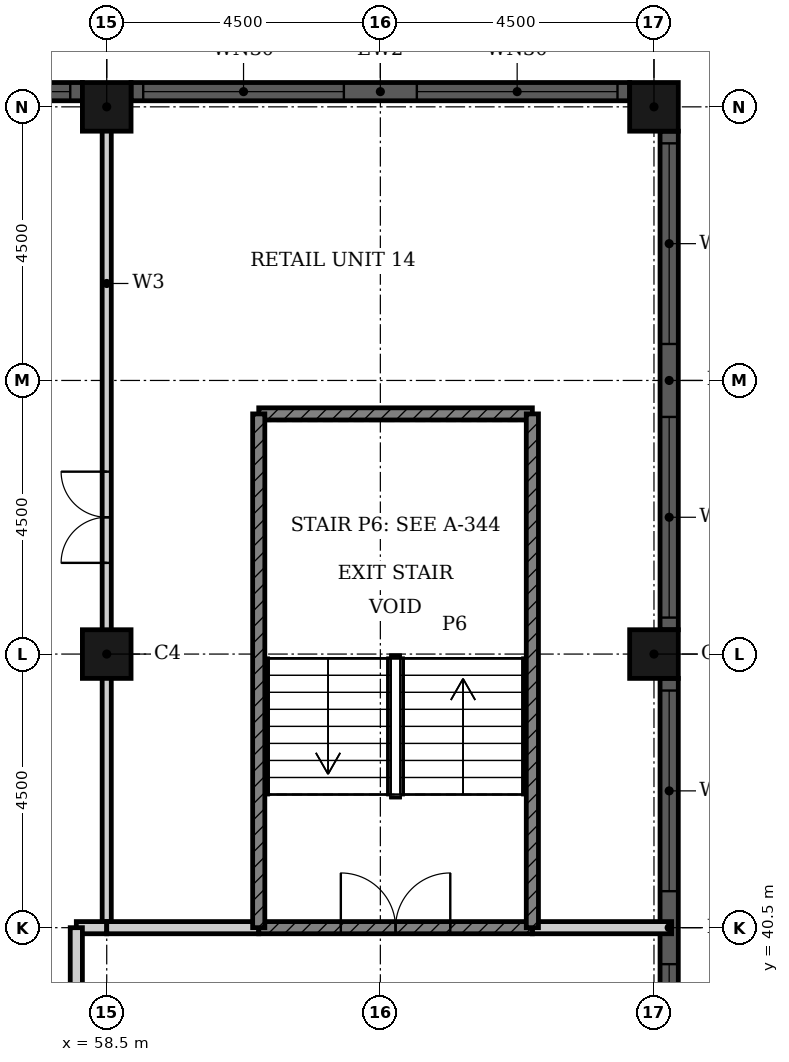
"""IFC4 building model, lengths in metres.
Left out: names, types, materials, properties, quantities, classifications, styles, units other than length and angle.
Written with IfcOpenShell. Run it as: python <this file> out.ifc"""

import sys

from ifc_helpers import new_model, si_unit, direction, frame, frame_2d, origin, origin_2d, place, context, subcontext, project, spatial, rectangle, hollow_rectangle, extrude, element, fill, save


model = new_model("IFC4")
c1 = context("Model", 3, precision=1e-05, world=origin(), true_north=direction((0.0, 1.0)))
c2 = subcontext(c1, "Body", "Model", "MODEL_VIEW")
j1 = project(units=[si_unit("LENGTHUNIT", "METRE"), si_unit("PLANEANGLEUNIT", "RADIAN")], contexts=[c1])
p1 = place(None, origin())
s1 = spatial("IfcSite", under=j1, at=p1, CompositionType="ELEMENT")
p2 = place(p1, origin())
s2 = spatial("IfcBuilding", under=s1, at=p2, CompositionType="ELEMENT")
p3 = place(p2, frame((0.0, 0.0, 6.6)))
s3 = spatial("IfcBuildingStorey", under=s2, at=p3, CompositionType="ELEMENT", Elevation=6.6)
for number, where, z_axis, x_axis in (
    (1, (58.5, 54.0, 0.0), (0.0, 0.0, 1.0), (1.0, 0.0, 0.0)),
    (2, (67.5, 45.0, 0.0), (0.0, 0.0, 1.0), (1.0, 0.0, 0.0)),
    (3, (67.5, 54.0, 0.0), (0.0, 0.0, 1.0), (1.0, 0.0, 0.0)),
    (4, (58.5, 45.0, 0.0), (0.0, 0.0, 1.0), (1.0, 0.0, 0.0)),
):
    element("IfcColumn", number, at=place(p3, frame(where, z_axis=z_axis, x_axis=x_axis)), inside=s3, PredefinedType="COLUMN", context=c2, shape_type="SweptSolid", body=[
        extrude(hollow_rectangle(XDim=0.8, YDim=0.8, WallThickness=0.025, at=origin_2d()), origin(), (0.0, 0.0, 1.0), 5.4),
    ])
p4 = place(p3, frame((67.75, 36.4, 0.0), z_axis=(0.0, 0.0, 1.0), x_axis=(0.0, 1.0, 0.0)))
e5 = element("IfcWall", 5, at=p4, inside=s3, PredefinedType="SOLIDWALL", context=c2, shape_type="SweptSolid", body=[
    extrude(rectangle(XDim=8.2, YDim=0.3, at=frame_2d((4.1, 0.0))), origin(), (0.0, 0.0, 1.0), 5.4),
])
p5 = place(p4, frame((0.2, 0.0, 0.9)))
e6 = element("IfcOpeningElement", 6, at=p5, cuts=e5, PredefinedType="OPENING", context=c2, shape_type="SweptSolid", body=[
    extrude(rectangle(XDim=3.3, YDim=3.5, at=frame_2d((1.65, 1.75))), frame((0.0, 0.16, 0.0), z_axis=(0.0, -1.0, 0.0), x_axis=(1.0, 0.0, 0.0)), (0.0, 0.0, 1.0), 0.32),
])
p6 = place(p4, frame((4.7, 0.0, 0.9)))
e7 = element("IfcOpeningElement", 7, at=p6, cuts=e5, PredefinedType="OPENING", context=c2, shape_type="SweptSolid", body=[
    extrude(rectangle(XDim=3.3, YDim=3.5, at=frame_2d((1.65, 1.75))), frame((0.0, 0.16, 0.0), z_axis=(0.0, -1.0, 0.0), x_axis=(1.0, 0.0, 0.0)), (0.0, 0.0, 1.0), 0.32),
])
p7 = place(p3, frame((67.75, 45.4, 0.0), z_axis=(0.0, 0.0, 1.0), x_axis=(0.0, 1.0, 0.0)))
e8 = element("IfcWall", 8, at=p7, inside=s3, PredefinedType="SOLIDWALL", context=c2, shape_type="SweptSolid", body=[
    extrude(rectangle(XDim=8.2, YDim=0.3, at=frame_2d((4.1, 0.0))), origin(), (0.0, 0.0, 1.0), 5.4),
])
p8 = place(p7, frame((0.2, 0.0, 0.9)))
e9 = element("IfcOpeningElement", 9, at=p8, cuts=e8, PredefinedType="OPENING", context=c2, shape_type="SweptSolid", body=[
    extrude(rectangle(XDim=3.3, YDim=3.5, at=frame_2d((1.65, 1.75))), frame((0.0, 0.16, 0.0), z_axis=(0.0, -1.0, 0.0), x_axis=(1.0, 0.0, 0.0)), (0.0, 0.0, 1.0), 0.32),
])
p9 = place(p7, frame((4.7, 0.0, 0.9)))
e10 = element("IfcOpeningElement", 10, at=p9, cuts=e8, PredefinedType="OPENING", context=c2, shape_type="SweptSolid", body=[
    extrude(rectangle(XDim=3.3, YDim=3.5, at=frame_2d((1.65, 1.75))), frame((0.0, 0.16, 0.0), z_axis=(0.0, -1.0, 0.0), x_axis=(1.0, 0.0, 0.0)), (0.0, 0.0, 1.0), 0.32),
])
p10 = place(p3, frame((67.1, 54.25, 0.0), z_axis=(0.0, 0.0, 1.0), x_axis=(-1.0, 0.0, 0.0)))
e11 = element("IfcWall", 11, at=p10, inside=s3, PredefinedType="SOLIDWALL", context=c2, shape_type="SweptSolid", body=[
    extrude(rectangle(XDim=8.2, YDim=0.3, at=frame_2d((4.1, 0.0))), origin(), (0.0, 0.0, 1.0), 5.4),
])
p11 = place(p10, frame((0.2, 0.0, 0.9)))
e12 = element("IfcOpeningElement", 12, at=p11, cuts=e11, PredefinedType="OPENING", context=c2, shape_type="SweptSolid", body=[
    extrude(rectangle(XDim=3.3, YDim=3.5, at=frame_2d((1.65, 1.75))), frame((0.0, 0.16, 0.0), z_axis=(0.0, -1.0, 0.0), x_axis=(1.0, 0.0, 0.0)), (0.0, 0.0, 1.0), 0.32),
])
p12 = place(p10, frame((4.7, 0.0, 0.9)))
e13 = element("IfcOpeningElement", 13, at=p12, cuts=e11, PredefinedType="OPENING", context=c2, shape_type="SweptSolid", body=[
    extrude(rectangle(XDim=3.3, YDim=3.5, at=frame_2d((1.65, 1.75))), frame((0.0, 0.16, 0.0), z_axis=(0.0, -1.0, 0.0), x_axis=(1.0, 0.0, 0.0)), (0.0, 0.0, 1.0), 0.32),
])
p13 = place(p3, frame((58.1, 54.25, 0.0), z_axis=(0.0, 0.0, 1.0), x_axis=(-1.0, 0.0, 0.0)))
e14 = element("IfcWall", 14, at=p13, inside=s3, PredefinedType="SOLIDWALL", context=c2, shape_type="SweptSolid", body=[
    extrude(rectangle(XDim=8.2, YDim=0.3, at=frame_2d((4.1, 0.0))), origin(), (0.0, 0.0, 1.0), 5.4),
])
p14 = place(p13, frame((0.2, 0.0, 0.9)))
e15 = element("IfcOpeningElement", 15, at=p14, cuts=e14, PredefinedType="OPENING", context=c2, shape_type="SweptSolid", body=[
    extrude(rectangle(XDim=3.3, YDim=3.5, at=frame_2d((1.65, 1.75))), frame((0.0, 0.16, 0.0), z_axis=(0.0, -1.0, 0.0), x_axis=(1.0, 0.0, 0.0)), (0.0, 0.0, 1.0), 0.32),
])
p15 = place(p13, frame((4.7, 0.0, 0.9)))
e16 = element("IfcOpeningElement", 16, at=p15, cuts=e14, PredefinedType="OPENING", context=c2, shape_type="SweptSolid", body=[
    extrude(rectangle(XDim=3.3, YDim=3.5, at=frame_2d((1.65, 1.75))), frame((0.0, 0.16, 0.0), z_axis=(0.0, -1.0, 0.0), x_axis=(1.0, 0.0, 0.0)), (0.0, 0.0, 1.0), 0.32),
])
p16 = place(p3, frame((58.5, 40.5, 0.0), z_axis=(0.0, 0.0, 1.0), x_axis=(0.0, 1.0, 0.0)))
e17 = element("IfcWall", 17, at=p16, inside=s3, PredefinedType="PARTITIONING", context=c2, shape_type="SweptSolid", body=[
    extrude(rectangle(XDim=13.69, YDim=0.15, at=frame_2d((6.845, 0.0))), origin(), (0.0, 0.0, 1.0), 5.05),
])
p17 = place(p16, frame((6.0, 0.0, 0.0)))
e18 = element("IfcOpeningElement", 18, at=p17, cuts=e17, PredefinedType="OPENING", context=c2, shape_type="SweptSolid", body=[
    extrude(rectangle(XDim=1.5, YDim=2.4, at=frame_2d((0.75, 1.2))), frame((0.0, 0.085, 0.0), z_axis=(0.0, -1.0, 0.0), x_axis=(1.0, 0.0, 0.0)), (0.0, 0.0, 1.0), 0.17),
])
p18 = place(p3, frame((58.0, 40.5, 0.0), z_axis=(0.0, 0.0, 1.0), x_axis=(1.0, 0.0, 0.0)))
e19 = element("IfcWall", 19, at=p18, inside=s3, PredefinedType="PARTITIONING", context=c2, shape_type="SweptSolid", body=[
    extrude(rectangle(XDim=0.5, YDim=0.2, at=frame_2d((0.25, 0.0))), origin(), (0.0, 0.0, 1.0), 5.05),
])
p19 = place(p3, frame((58.5, 40.5, 0.0), z_axis=(0.0, 0.0, 1.0), x_axis=(1.0, 0.0, 0.0)))
e20 = element("IfcWall", 20, at=p19, inside=s3, PredefinedType="PARTITIONING", context=c2, shape_type="SweptSolid", body=[
    extrude(rectangle(XDim=2.5, YDim=0.2, at=frame_2d((1.25, 0.0))), origin(), (0.0, 0.0, 1.0), 5.05),
])
p20 = place(p3, frame((65.5, 40.5, 0.0), z_axis=(0.0, 0.0, 1.0), x_axis=(1.0, 0.0, 0.0)))
e21 = element("IfcWall", 21, at=p20, inside=s3, PredefinedType="PARTITIONING", context=c2, shape_type="SweptSolid", body=[
    extrude(rectangle(XDim=2.29, YDim=0.2, at=frame_2d((1.145, 0.0))), origin(), (0.0, 0.0, 1.0), 5.05),
])
p21 = place(p3, frame((58.0, 37.5, 0.0), z_axis=(0.0, 0.0, 1.0), x_axis=(0.0, 1.0, 0.0)))
e22 = element("IfcWall", 22, at=p21, inside=s3, PredefinedType="PARTITIONING", context=c2, shape_type="SweptSolid", body=[
    extrude(rectangle(XDim=3.0, YDim=0.2, at=frame_2d((1.5, 0.0))), origin(), (0.0, 0.0, 1.0), 5.05),
])
p22 = place(p3, frame((61.0, 40.5, 0.0), z_axis=(0.0, 0.0, 1.0), x_axis=(1.0, 0.0, 0.0)))
e23 = element("IfcWall", 23, at=p22, inside=s3, PredefinedType="SHEAR", context=c2, shape_type="SweptSolid", body=[
    extrude(rectangle(XDim=4.5, YDim=0.2, at=frame_2d((2.25, 0.0))), origin(), (0.0, 0.0, 1.0), 5.05),
])
p23 = place(p22, frame((1.35, 0.0, 0.0)))
e24 = element("IfcOpeningElement", 24, at=p23, cuts=e23, PredefinedType="OPENING", context=c2, shape_type="SweptSolid", body=[
    extrude(rectangle(XDim=1.8, YDim=2.1, at=frame_2d((0.9, 1.05))), frame((0.0, 0.11, 0.0), z_axis=(0.0, -1.0, 0.0), x_axis=(1.0, 0.0, 0.0)), (0.0, 0.0, 1.0), 0.22),
])
p24 = place(p3, frame((61.0, 48.95, 0.0), z_axis=(0.0, 0.0, 1.0), x_axis=(1.0, 0.0, 0.0)))
e25 = element("IfcWall", 25, at=p24, inside=s3, PredefinedType="SHEAR", context=c2, shape_type="SweptSolid", body=[
    extrude(rectangle(XDim=4.5, YDim=0.2, at=frame_2d((2.25, 0.0))), origin(), (0.0, 0.0, 1.0), 5.05),
])
for number, where, z_axis, x_axis in (
    (26, (61.0, 40.5, 0.0), (0.0, 0.0, 1.0), (0.0, 1.0, 0.0)),
    (27, (65.5, 40.5, 0.0), (0.0, 0.0, 1.0), (0.0, 1.0, 0.0)),
):
    element("IfcWall", number, at=place(p3, frame(where, z_axis=z_axis, x_axis=x_axis)), inside=s3, PredefinedType="SHEAR", context=c2, shape_type="SweptSolid", body=[
        extrude(rectangle(XDim=8.45, YDim=0.2, at=frame_2d((4.225, 0.0))), origin(), (0.0, 0.0, 1.0), 5.05),
    ])
p25 = place(p5, origin())
e28 = element("IfcWindow", 28, at=p25, inside=s3, PartitioningType="SINGLE_PANEL", PredefinedType="WINDOW", context=c2, shape_type="SweptSolid", body=[
    extrude(rectangle(XDim=3.3, YDim=3.5, at=frame_2d((1.65, 1.75))), frame((0.0, 0.03, 0.0), z_axis=(0.0, -1.0, 0.0), x_axis=(1.0, 0.0, 0.0)), (0.0, 0.0, 1.0), 0.06),
])
fill(e6, e28)
p26 = place(p6, origin())
e29 = element("IfcWindow", 29, at=p26, inside=s3, PartitioningType="SINGLE_PANEL", PredefinedType="WINDOW", context=c2, shape_type="SweptSolid", body=[
    extrude(rectangle(XDim=3.3, YDim=3.5, at=frame_2d((1.65, 1.75))), frame((0.0, 0.03, 0.0), z_axis=(0.0, -1.0, 0.0), x_axis=(1.0, 0.0, 0.0)), (0.0, 0.0, 1.0), 0.06),
])
fill(e7, e29)
p27 = place(p8, origin())
e30 = element("IfcWindow", 30, at=p27, inside=s3, PartitioningType="SINGLE_PANEL", PredefinedType="WINDOW", context=c2, shape_type="SweptSolid", body=[
    extrude(rectangle(XDim=3.3, YDim=3.5, at=frame_2d((1.65, 1.75))), frame((0.0, 0.03, 0.0), z_axis=(0.0, -1.0, 0.0), x_axis=(1.0, 0.0, 0.0)), (0.0, 0.0, 1.0), 0.06),
])
fill(e9, e30)
p28 = place(p9, origin())
e31 = element("IfcWindow", 31, at=p28, inside=s3, PartitioningType="SINGLE_PANEL", PredefinedType="WINDOW", context=c2, shape_type="SweptSolid", body=[
    extrude(rectangle(XDim=3.3, YDim=3.5, at=frame_2d((1.65, 1.75))), frame((0.0, 0.03, 0.0), z_axis=(0.0, -1.0, 0.0), x_axis=(1.0, 0.0, 0.0)), (0.0, 0.0, 1.0), 0.06),
])
fill(e10, e31)
p29 = place(p11, origin())
e32 = element("IfcWindow", 32, at=p29, inside=s3, PartitioningType="SINGLE_PANEL", PredefinedType="WINDOW", context=c2, shape_type="SweptSolid", body=[
    extrude(rectangle(XDim=3.3, YDim=3.5, at=frame_2d((1.65, 1.75))), frame((0.0, 0.03, 0.0), z_axis=(0.0, -1.0, 0.0), x_axis=(1.0, 0.0, 0.0)), (0.0, 0.0, 1.0), 0.06),
])
fill(e12, e32)
p30 = place(p12, origin())
e33 = element("IfcWindow", 33, at=p30, inside=s3, PartitioningType="SINGLE_PANEL", PredefinedType="WINDOW", context=c2, shape_type="SweptSolid", body=[
    extrude(rectangle(XDim=3.3, YDim=3.5, at=frame_2d((1.65, 1.75))), frame((0.0, 0.03, 0.0), z_axis=(0.0, -1.0, 0.0), x_axis=(1.0, 0.0, 0.0)), (0.0, 0.0, 1.0), 0.06),
])
fill(e13, e33)
p31 = place(p14, origin())
e34 = element("IfcWindow", 34, at=p31, inside=s3, PartitioningType="SINGLE_PANEL", PredefinedType="WINDOW", context=c2, shape_type="SweptSolid", body=[
    extrude(rectangle(XDim=3.3, YDim=3.5, at=frame_2d((1.65, 1.75))), frame((0.0, 0.03, 0.0), z_axis=(0.0, -1.0, 0.0), x_axis=(1.0, 0.0, 0.0)), (0.0, 0.0, 1.0), 0.06),
])
fill(e15, e34)
p32 = place(p23, origin())
e35 = element("IfcDoor", 35, at=p32, inside=s3, OperationType="DOUBLE_DOOR_SINGLE_SWING", PredefinedType="DOOR", context=c2, shape_type="SweptSolid", body=[
    extrude(rectangle(XDim=1.8, YDim=2.1, at=frame_2d((0.9, 1.05))), frame((0.0, 0.025, 0.0), z_axis=(0.0, -1.0, 0.0), x_axis=(1.0, 0.0, 0.0)), (0.0, 0.0, 1.0), 0.05),
])
fill(e24, e35)
p33 = place(p17, origin())
e36 = element("IfcDoor", 36, at=p33, inside=s3, OperationType="DOUBLE_DOOR_SINGLE_SWING", PredefinedType="DOOR", context=c2, shape_type="SweptSolid", body=[
    extrude(rectangle(XDim=1.5, YDim=2.4, at=frame_2d((0.75, 1.2))), frame((0.0, 0.025, 0.0), z_axis=(0.0, -1.0, 0.0), x_axis=(1.0, 0.0, 0.0)), (0.0, 0.0, 1.0), 0.05),
])
fill(e18, e36)
save(model, sys.argv[1])
